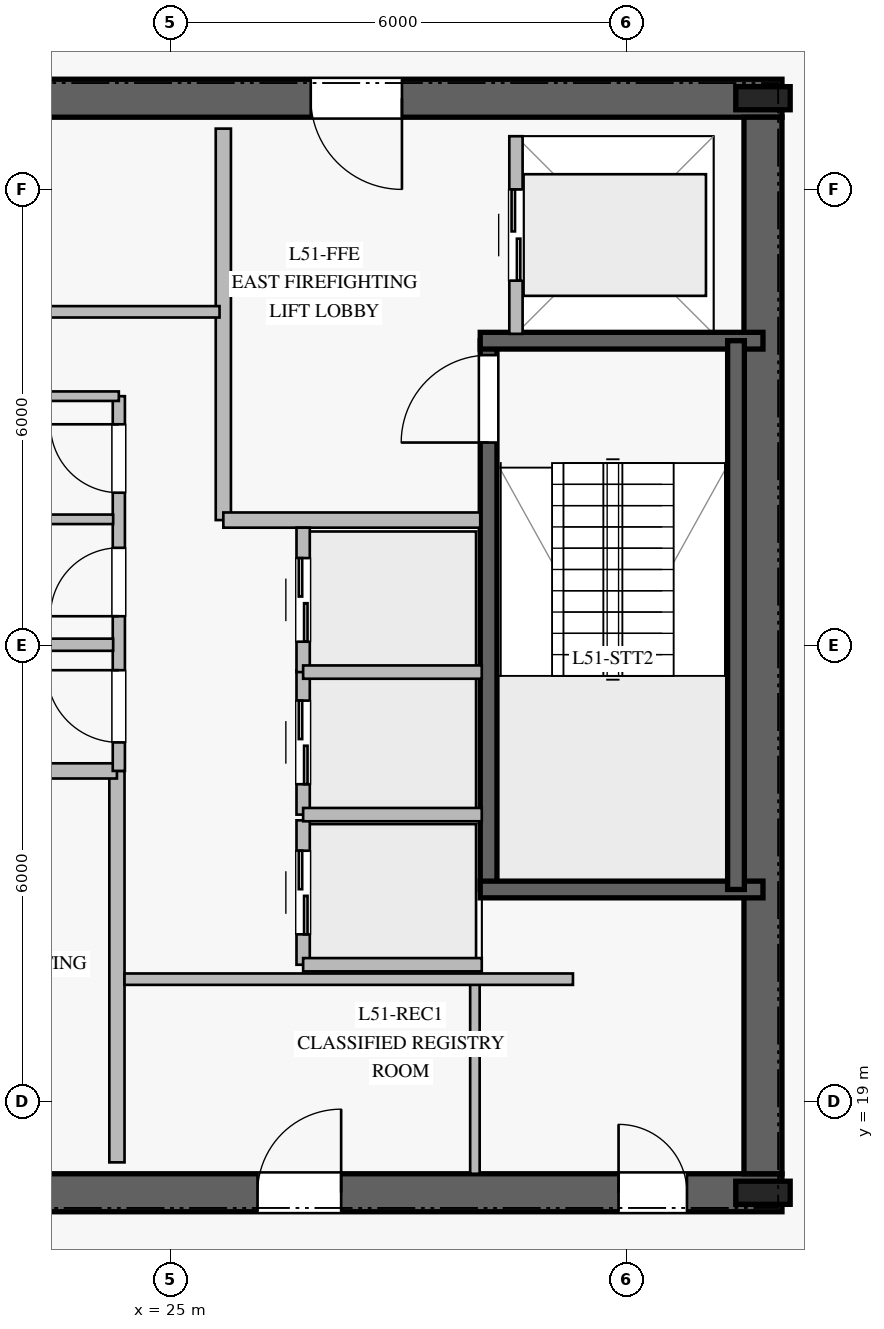
"""IFC4 building model, lengths in metres.
Left out: names, types, materials, properties, quantities, classifications, styles, units other than length and angle.
Written with IfcOpenShell. Run it as: python <this file> out.ifc"""

import sys

from ifc_helpers import new_model, si_unit, direction, frame, frame_2d, origin, origin_2d, place, context, subcontext, project, spatial, rectangle, i_section, extrude, element, fill, save


model = new_model("IFC4")
c1 = context("Model", 3, precision=1e-05, world=origin(), true_north=direction((0.0, 1.0)))
c2 = subcontext(c1, "Body", "Model", "MODEL_VIEW")
j1 = project(units=[si_unit("LENGTHUNIT", "METRE"), si_unit("PLANEANGLEUNIT", "RADIAN")], contexts=[c1])
p1 = place(None, origin())
s1 = spatial("IfcSite", under=j1, at=p1, CompositionType="ELEMENT")
p2 = place(p1, origin())
s2 = spatial("IfcBuilding", under=s1, at=p2, CompositionType="ELEMENT")
p3 = place(p2, frame((0.0, 0.0, 212.8)))
s3 = spatial("IfcBuildingStorey", under=s2, at=p3, CompositionType="ELEMENT", Elevation=212.8)
p4 = place(p3, frame((16.95, 17.8, 0.0), z_axis=(0.0, 0.0, 1.0), x_axis=(1.0, 0.0, 0.0)))
e1 = element("IfcWall", 1, at=p4, inside=s3, PredefinedType="SHEAR", context=c2, shape_type="SweptSolid", body=[
    extrude(rectangle(XDim=16.1, YDim=0.5, at=frame_2d((8.05, 0.0))), origin(), (0.0, 0.0, 1.0), 3.78),
])
p5 = place(p4, frame((5.0, 0.0, 0.0)))
e2 = element("IfcOpeningElement", 2, at=p5, cuts=e1, PredefinedType="OPENING", context=c2, shape_type="SweptSolid", body=[
    extrude(rectangle(XDim=1.2, YDim=2.25, at=frame_2d((0.6, 1.125))), frame((0.0, 0.26, 0.0), z_axis=(0.0, -1.0, 0.0), x_axis=(1.0, 0.0, 0.0)), (0.0, 0.0, 1.0), 0.52),
])
p6 = place(p4, frame((13.95, 0.0, 0.0)))
e3 = element("IfcOpeningElement", 3, at=p6, cuts=e1, PredefinedType="OPENING", context=c2, shape_type="SweptSolid", body=[
    extrude(rectangle(XDim=0.9, YDim=2.1, at=frame_2d((0.45, 1.05))), frame((0.0, 0.26, 0.0), z_axis=(0.0, -1.0, 0.0), x_axis=(1.0, 0.0, 0.0)), (0.0, 0.0, 1.0), 0.52),
])
p7 = place(p4, frame((9.2, 0.0, 0.0)))
e4 = element("IfcOpeningElement", 4, at=p7, cuts=e1, PredefinedType="OPENING", context=c2, shape_type="SweptSolid", body=[
    extrude(rectangle(XDim=1.1, YDim=2.2, at=frame_2d((0.55, 1.1))), frame((0.0, 0.26, 0.0), z_axis=(0.0, -1.0, 0.0), x_axis=(1.0, 0.0, 0.0)), (0.0, 0.0, 1.0), 0.52),
])
p8 = place(p3, frame((33.05, 32.2, 0.0), z_axis=(0.0, 0.0, 1.0), x_axis=(-1.0, 0.0, 0.0)))
e5 = element("IfcWall", 5, at=p8, inside=s3, PredefinedType="SHEAR", context=c2, shape_type="SweptSolid", body=[
    extrude(rectangle(XDim=16.1, YDim=0.5, at=frame_2d((8.05, 0.0))), origin(), (0.0, 0.0, 1.0), 3.78),
])
p9 = place(p8, frame((5.0, 0.0, 0.0)))
e6 = element("IfcOpeningElement", 6, at=p9, cuts=e5, PredefinedType="OPENING", context=c2, shape_type="SweptSolid", body=[
    extrude(rectangle(XDim=1.2, YDim=2.25, at=frame_2d((0.6, 1.125))), frame((0.0, 0.26, 0.0), z_axis=(0.0, -1.0, 0.0), x_axis=(1.0, 0.0, 0.0)), (0.0, 0.0, 1.0), 0.52),
])
p10 = place(p8, frame((9.825, 0.0, 0.0)))
e7 = element("IfcOpeningElement", 7, at=p10, cuts=e5, PredefinedType="OPENING", context=c2, shape_type="SweptSolid", body=[
    extrude(rectangle(XDim=1.1, YDim=2.2, at=frame_2d((0.55, 1.1))), frame((0.0, 0.26, 0.0), z_axis=(0.0, -1.0, 0.0), x_axis=(1.0, 0.0, 0.0)), (0.0, 0.0, 1.0), 0.52),
])
p11 = place(p3, frame((32.8, 18.05, 0.0), z_axis=(0.0, 0.0, 1.0), x_axis=(0.0, 1.0, 0.0)))
e8 = element("IfcWall", 8, at=p11, inside=s3, PredefinedType="SHEAR", context=c2, shape_type="SweptSolid", body=[
    extrude(rectangle(XDim=13.9, YDim=0.5, at=frame_2d((6.95, 0.0))), origin(), (0.0, 0.0, 1.0), 3.78),
])
for number, where, z_axis, x_axis in (
    (9, (32.8, 17.8, 0.0), (0.0, 0.0, 1.0), (1.0, 0.0, 0.0)),
    (10, (32.8, 32.2, 0.0), (0.0, 0.0, 1.0), (1.0, 0.0, 0.0)),
):
    element("IfcColumn", number, at=place(p3, frame(where, z_axis=z_axis, x_axis=x_axis)), inside=s3, PredefinedType="COLUMN", context=c2, shape_type="SweptSolid", body=[
        extrude(i_section(OverallWidth=0.304, OverallDepth=0.716, WebThickness=0.021, FlangeThickness=0.04, at=origin_2d()), origin(), (0.0, 0.0, 1.0), 4.0),
    ])
p12 = place(p3, frame((29.19, 21.79, 0.0), z_axis=(0.0, 0.0, 1.0), x_axis=(0.0, 1.0, 0.0)))
e11 = element("IfcWall", 11, at=p12, inside=s3, PredefinedType="SOLIDWALL", context=c2, shape_type="SweptSolid", body=[
    extrude(rectangle(XDim=7.22, YDim=0.22, at=frame_2d((3.61, 0.0))), origin(), (0.0, 0.0, 1.0), 3.78),
])
p13 = place(p12, frame((5.88, 0.0, 0.0)))
e12 = element("IfcOpeningElement", 12, at=p13, cuts=e11, PredefinedType="OPENING", context=c2, shape_type="SweptSolid", body=[
    extrude(rectangle(XDim=1.15, YDim=2.2, at=frame_2d((0.575, 1.1))), frame((0.0, 0.12, 0.0), z_axis=(0.0, -1.0, 0.0), x_axis=(1.0, 0.0, 0.0)), (0.0, 0.0, 1.0), 0.24),
])
for number, where, z_axis, x_axis in (
    (13, (29.08, 21.79, 0.0), (0.0, 0.0, 1.0), (1.0, 0.0, 0.0)),
    (14, (29.08, 29.01, 0.0), (0.0, 0.0, 1.0), (1.0, 0.0, 0.0)),
):
    element("IfcWall", number, at=place(p3, frame(where, z_axis=z_axis, x_axis=x_axis)), inside=s3, PredefinedType="SOLIDWALL", context=c2, shape_type="SweptSolid", body=[
        extrude(rectangle(XDim=3.72, YDim=0.22, at=frame_2d((1.86, 0.0))), origin(), (0.0, 0.0, 1.0), 3.78),
    ])
p14 = place(p3, frame((32.445, 29.01, 0.0), z_axis=(0.0, 0.0, 1.0), x_axis=(0.0, -1.0, 0.0)))
e15 = element("IfcWall", 15, at=p14, inside=s3, PredefinedType="SOLIDWALL", context=c2, shape_type="SweptSolid", body=[
    extrude(rectangle(XDim=7.22, YDim=0.22, at=frame_2d((3.61, 0.0))), origin(), (0.0, 0.0, 1.0), 3.78),
])
p15 = place(p3, frame((24.3, 18.2, 0.0), z_axis=(0.0, 0.0, 1.0), x_axis=(0.0, 1.0, 0.0)))
e16 = element("IfcWall", 16, at=p15, inside=s3, PredefinedType="PARTITIONING", context=c2, shape_type="SweptSolid", body=[
    extrude(rectangle(XDim=5.15, YDim=0.2, at=frame_2d((2.575, 0.0))), origin(), (0.0, 0.0, 1.0), 3.78),
])
p16 = place(p3, frame((20.92, 23.35, 0.0), z_axis=(0.0, 0.0, 1.0), x_axis=(1.0, 0.0, 0.0)))
e17 = element("IfcWall", 17, at=p16, inside=s3, PredefinedType="PARTITIONING", context=c2, shape_type="SweptSolid", body=[
    extrude(rectangle(XDim=3.38, YDim=0.2, at=frame_2d((1.69, 0.0))), origin(), (0.0, 0.0, 1.0), 3.78),
])
p17 = place(p3, frame((25.7, 26.65, 0.0), z_axis=(0.0, 0.0, 1.0), x_axis=(0.0, 1.0, 0.0)))
e18 = element("IfcWall", 18, at=p17, inside=s3, PredefinedType="PARTITIONING", context=c2, shape_type="SweptSolid", body=[
    extrude(rectangle(XDim=5.15, YDim=0.2, at=frame_2d((2.575, 0.0))), origin(), (0.0, 0.0, 1.0), 3.78),
])
p18 = place(p3, frame((25.7, 26.65, 0.0), z_axis=(0.0, 0.0, 1.0), x_axis=(1.0, 0.0, 0.0)))
e19 = element("IfcWall", 19, at=p18, inside=s3, PredefinedType="PARTITIONING", context=c2, shape_type="SweptSolid", body=[
    extrude(rectangle(XDim=3.38, YDim=0.2, at=frame_2d((1.69, 0.0))), origin(), (0.0, 0.0, 1.0), 3.78),
])
p19 = place(p3, frame((24.325, 23.35, 0.0), z_axis=(0.0, 0.0, 1.0), x_axis=(0.0, 1.0, 0.0)))
e20 = element("IfcWall", 20, at=p19, inside=s3, PredefinedType="PLUMBINGWALL", context=c2, shape_type="SweptSolid", body=[
    extrude(rectangle(XDim=4.93, YDim=0.16, at=frame_2d((2.465, 0.0))), origin(), (0.0, 0.0, 1.0), 3.78),
])
p20 = place(p19, frame((0.375, 0.0, 0.0)))
e21 = element("IfcOpeningElement", 21, at=p20, cuts=e20, PredefinedType="OPENING", context=c2, shape_type="SweptSolid", body=[
    extrude(rectangle(XDim=0.95, YDim=2.1, at=frame_2d((0.475, 1.05))), frame((0.0, 0.09, 0.0), z_axis=(0.0, -1.0, 0.0), x_axis=(1.0, 0.0, 0.0)), (0.0, 0.0, 1.0), 0.18),
])
p21 = place(p19, frame((2.035, 0.0, 0.0)))
e22 = element("IfcOpeningElement", 22, at=p21, cuts=e20, PredefinedType="OPENING", context=c2, shape_type="SweptSolid", body=[
    extrude(rectangle(XDim=0.9, YDim=2.1, at=frame_2d((0.45, 1.05))), frame((0.0, 0.09, 0.0), z_axis=(0.0, -1.0, 0.0), x_axis=(1.0, 0.0, 0.0)), (0.0, 0.0, 1.0), 0.18),
])
p22 = place(p19, frame((3.66, 0.0, 0.0)))
e23 = element("IfcOpeningElement", 23, at=p22, cuts=e20, PredefinedType="OPENING", context=c2, shape_type="SweptSolid", body=[
    extrude(rectangle(XDim=0.9, YDim=2.1, at=frame_2d((0.45, 1.05))), frame((0.0, 0.09, 0.0), z_axis=(0.0, -1.0, 0.0), x_axis=(1.0, 0.0, 0.0)), (0.0, 0.0, 1.0), 0.18),
])
p23 = place(p3, frame((20.92, 28.28, 0.0), z_axis=(0.0, 0.0, 1.0), x_axis=(1.0, 0.0, 0.0)))
e24 = element("IfcWall", 24, at=p23, inside=s3, PredefinedType="PARTITIONING", context=c2, shape_type="SweptSolid", body=[
    extrude(rectangle(XDim=3.405, YDim=0.125, at=frame_2d((1.703, 0.0))), origin(), (0.0, 0.0, 1.0), 3.78),
])
p24 = place(p3, frame((29.01, 18.05, 0.0), z_axis=(0.0, 0.0, 1.0), x_axis=(0.0, 1.0, 0.0)))
e25 = element("IfcWall", 25, at=p24, inside=s3, PredefinedType="PARTITIONING", context=c2, shape_type="SweptSolid", body=[
    extrude(rectangle(XDim=2.5, YDim=0.125, at=frame_2d((1.25, 0.0))), origin(), (0.0, 0.0, 1.0), 3.78),
])
p25 = place(p3, frame((20.95, 25.01, 0.0), z_axis=(0.0, 0.0, 1.0), x_axis=(1.0, 0.0, 0.0)))
e26 = element("IfcWall", 26, at=p25, inside=s3, PredefinedType="PLUMBINGWALL", context=c2, shape_type="SweptSolid", body=[
    extrude(rectangle(XDim=3.3, YDim=0.16, at=frame_2d((1.65, 0.0))), origin(), (0.0, 0.0, 1.0), 3.78),
])
p26 = place(p3, frame((20.95, 26.66, 0.0), z_axis=(0.0, 0.0, 1.0), x_axis=(1.0, 0.0, 0.0)))
e27 = element("IfcWall", 27, at=p26, inside=s3, PredefinedType="PARTITIONING", context=c2, shape_type="SweptSolid", body=[
    extrude(rectangle(XDim=3.3, YDim=0.125, at=frame_2d((1.65, 0.0))), origin(), (0.0, 0.0, 1.0), 3.78),
])
p27 = place(p3, frame((24.4, 20.61, 0.0), z_axis=(0.0, 0.0, 1.0), x_axis=(1.0, 0.0, 0.0)))
e28 = element("IfcWall", 28, at=p27, inside=s3, PredefinedType="PARTITIONING", context=c2, shape_type="SweptSolid", body=[
    extrude(rectangle(XDim=5.9, YDim=0.15, at=frame_2d((2.95, 0.0))), origin(), (0.0, 0.0, 1.0), 3.78),
])
p28 = place(p3, frame((19.75, 29.39, 0.0), z_axis=(0.0, 0.0, 1.0), x_axis=(1.0, 0.0, 0.0)))
e29 = element("IfcWall", 29, at=p28, inside=s3, PredefinedType="PARTITIONING", context=c2, shape_type="SweptSolid", body=[
    extrude(rectangle(XDim=5.9, YDim=0.15, at=frame_2d((2.95, 0.0))), origin(), (0.0, 0.0, 1.0), 3.78),
])
p29 = place(p3, frame((26.75, 20.8, 0.0), z_axis=(0.0, 0.0, 1.0), x_axis=(0.0, 1.0, 0.0)))
e30 = element("IfcWall", 30, at=p29, inside=s3, PredefinedType="PARTITIONING", context=c2, shape_type="SweptSolid", body=[
    extrude(rectangle(XDim=1.9, YDim=0.175, at=frame_2d((0.95, 0.0))), origin(), (0.0, 0.0, 1.0), 3.78),
])
p30 = place(p29, frame((0.4, 0.0, 0.0)))
e31 = element("IfcOpeningElement", 31, at=p30, cuts=e30, PredefinedType="OPENING", context=c2, shape_type="SweptSolid", body=[
    extrude(rectangle(XDim=1.1, YDim=2.2, at=frame_2d((0.55, 1.1))), frame((0.0, 0.098, 0.0), z_axis=(0.0, -1.0, 0.0), x_axis=(1.0, 0.0, 0.0)), (0.0, 0.0, 1.0), 0.195),
])
p31 = place(p3, frame((26.75, 20.8, 0.0), z_axis=(0.0, 0.0, 1.0), x_axis=(1.0, 0.0, 0.0)))
e32 = element("IfcWall", 32, at=p31, inside=s3, PredefinedType="PARTITIONING", context=c2, shape_type="SweptSolid", body=[
    extrude(rectangle(XDim=2.35, YDim=0.175, at=frame_2d((1.175, 0.0))), origin(), (0.0, 0.0, 1.0), 3.78),
])
p32 = place(p3, frame((26.75, 22.775, 0.0), z_axis=(0.0, 0.0, 1.0), x_axis=(0.0, 1.0, 0.0)))
e33 = element("IfcWall", 33, at=p32, inside=s3, PredefinedType="PARTITIONING", context=c2, shape_type="SweptSolid", body=[
    extrude(rectangle(XDim=1.9, YDim=0.175, at=frame_2d((0.95, 0.0))), origin(), (0.0, 0.0, 1.0), 3.78),
])
p33 = place(p32, frame((0.4, 0.0, 0.0)))
e34 = element("IfcOpeningElement", 34, at=p33, cuts=e33, PredefinedType="OPENING", context=c2, shape_type="SweptSolid", body=[
    extrude(rectangle(XDim=1.1, YDim=2.2, at=frame_2d((0.55, 1.1))), frame((0.0, 0.098, 0.0), z_axis=(0.0, -1.0, 0.0), x_axis=(1.0, 0.0, 0.0)), (0.0, 0.0, 1.0), 0.195),
])
p34 = place(p3, frame((26.75, 22.775, 0.0), z_axis=(0.0, 0.0, 1.0), x_axis=(1.0, 0.0, 0.0)))
e35 = element("IfcWall", 35, at=p34, inside=s3, PredefinedType="PARTITIONING", context=c2, shape_type="SweptSolid", body=[
    extrude(rectangle(XDim=2.35, YDim=0.175, at=frame_2d((1.175, 0.0))), origin(), (0.0, 0.0, 1.0), 3.78),
])
p35 = place(p3, frame((26.75, 24.65, 0.0), z_axis=(0.0, 0.0, 1.0), x_axis=(0.0, 1.0, 0.0)))
e36 = element("IfcWall", 36, at=p35, inside=s3, PredefinedType="PARTITIONING", context=c2, shape_type="SweptSolid", body=[
    extrude(rectangle(XDim=1.9, YDim=0.175, at=frame_2d((0.95, 0.0))), origin(), (0.0, 0.0, 1.0), 3.78),
])
p36 = place(p35, frame((0.4, 0.0, 0.0)))
e37 = element("IfcOpeningElement", 37, at=p36, cuts=e36, PredefinedType="OPENING", context=c2, shape_type="SweptSolid", body=[
    extrude(rectangle(XDim=1.1, YDim=2.2, at=frame_2d((0.55, 1.1))), frame((0.0, 0.098, 0.0), z_axis=(0.0, -1.0, 0.0), x_axis=(1.0, 0.0, 0.0)), (0.0, 0.0, 1.0), 0.195),
])
p37 = place(p3, frame((26.75, 24.65, 0.0), z_axis=(0.0, 0.0, 1.0), x_axis=(1.0, 0.0, 0.0)))
e38 = element("IfcWall", 38, at=p37, inside=s3, PredefinedType="PARTITIONING", context=c2, shape_type="SweptSolid", body=[
    extrude(rectangle(XDim=2.35, YDim=0.175, at=frame_2d((1.175, 0.0))), origin(), (0.0, 0.0, 1.0), 3.78),
])
p38 = place(p3, frame((29.55, 29.1, 0.0), z_axis=(0.0, 0.0, 1.0), x_axis=(0.0, 1.0, 0.0)))
e39 = element("IfcWall", 39, at=p38, inside=s3, PredefinedType="PARTITIONING", context=c2, shape_type="SweptSolid", body=[
    extrude(rectangle(XDim=2.6, YDim=0.175, at=frame_2d((1.3, 0.0))), origin(), (0.0, 0.0, 1.0), 3.78),
])
p39 = place(p38, frame((0.7, 0.0, 0.0)))
e40 = element("IfcOpeningElement", 40, at=p39, cuts=e39, PredefinedType="OPENING", context=c2, shape_type="SweptSolid", body=[
    extrude(rectangle(XDim=1.2, YDim=2.2, at=frame_2d((0.6, 1.1))), frame((0.0, 0.098, 0.0), z_axis=(0.0, -1.0, 0.0), x_axis=(1.0, 0.0, 0.0)), (0.0, 0.0, 1.0), 0.195),
])
p40 = place(p13, origin())
e41 = element("IfcDoor", 41, at=p40, inside=s3, OperationType="SINGLE_SWING_LEFT", PredefinedType="DOOR", context=c2, shape_type="SweptSolid", body=[
    extrude(rectangle(XDim=1.15, YDim=2.2, at=frame_2d((0.575, 1.1))), frame((0.0, 0.025, 0.0), z_axis=(0.0, -1.0, 0.0), x_axis=(1.0, 0.0, 0.0)), (0.0, 0.0, 1.0), 0.05),
])
fill(e12, e41)
p41 = place(p9, origin())
e42 = element("IfcDoor", 42, at=p41, inside=s3, OperationType="SINGLE_SWING_LEFT", PredefinedType="DOOR", context=c2, shape_type="SweptSolid", body=[
    extrude(rectangle(XDim=1.2, YDim=2.25, at=frame_2d((0.6, 1.125))), frame((0.0, 0.025, 0.0), z_axis=(0.0, -1.0, 0.0), x_axis=(1.0, 0.0, 0.0)), (0.0, 0.0, 1.0), 0.05),
])
fill(e6, e42)
p42 = place(p20, origin())
e43 = element("IfcDoor", 43, at=p42, inside=s3, OperationType="SINGLE_SWING_RIGHT", PredefinedType="DOOR", context=c2, shape_type="SweptSolid", body=[
    extrude(rectangle(XDim=0.95, YDim=2.1, at=frame_2d((0.475, 1.05))), frame((0.0, 0.025, 0.0), z_axis=(0.0, -1.0, 0.0), x_axis=(1.0, 0.0, 0.0)), (0.0, 0.0, 1.0), 0.05),
])
fill(e21, e43)
p43 = place(p21, origin())
e44 = element("IfcDoor", 44, at=p43, inside=s3, OperationType="SINGLE_SWING_LEFT", PredefinedType="DOOR", context=c2, shape_type="SweptSolid", body=[
    extrude(rectangle(XDim=0.9, YDim=2.1, at=frame_2d((0.45, 1.05))), frame((0.0, 0.025, 0.0), z_axis=(0.0, -1.0, 0.0), x_axis=(1.0, 0.0, 0.0)), (0.0, 0.0, 1.0), 0.05),
])
fill(e22, e44)
p44 = place(p22, origin())
e45 = element("IfcDoor", 45, at=p44, inside=s3, OperationType="SINGLE_SWING_RIGHT", PredefinedType="DOOR", context=c2, shape_type="SweptSolid", body=[
    extrude(rectangle(XDim=0.9, YDim=2.1, at=frame_2d((0.45, 1.05))), frame((0.0, 0.025, 0.0), z_axis=(0.0, -1.0, 0.0), x_axis=(1.0, 0.0, 0.0)), (0.0, 0.0, 1.0), 0.05),
])
fill(e23, e45)
p45 = place(p6, origin())
e46 = element("IfcDoor", 46, at=p45, inside=s3, OperationType="SINGLE_SWING_LEFT", PredefinedType="DOOR", context=c2, shape_type="SweptSolid", body=[
    extrude(rectangle(XDim=0.9, YDim=2.1, at=frame_2d((0.45, 1.05))), frame((0.0, 0.025, 0.0), z_axis=(0.0, -1.0, 0.0), x_axis=(1.0, 0.0, 0.0)), (0.0, 0.0, 1.0), 0.05),
])
fill(e3, e46)
p46 = place(p7, origin())
e47 = element("IfcDoor", 47, at=p46, inside=s3, OperationType="SINGLE_SWING_RIGHT", PredefinedType="DOOR", context=c2, shape_type="SweptSolid", body=[
    extrude(rectangle(XDim=1.1, YDim=2.2, at=frame_2d((0.55, 1.1))), frame((0.0, 0.025, 0.0), z_axis=(0.0, -1.0, 0.0), x_axis=(1.0, 0.0, 0.0)), (0.0, 0.0, 1.0), 0.05),
])
fill(e4, e47)
p47 = place(p30, origin())
e48 = element("IfcDoor", 48, at=p47, inside=s3, OperationType="DOUBLE_DOOR_SLIDING", PredefinedType="DOOR", context=c2, shape_type="SweptSolid", body=[
    extrude(rectangle(XDim=1.1, YDim=2.2, at=frame_2d((0.55, 1.1))), frame((0.0, 0.025, 0.0), z_axis=(0.0, -1.0, 0.0), x_axis=(1.0, 0.0, 0.0)), (0.0, 0.0, 1.0), 0.05),
])
fill(e31, e48)
p48 = place(p33, origin())
e49 = element("IfcDoor", 49, at=p48, inside=s3, OperationType="DOUBLE_DOOR_SLIDING", PredefinedType="DOOR", context=c2, shape_type="SweptSolid", body=[
    extrude(rectangle(XDim=1.1, YDim=2.2, at=frame_2d((0.55, 1.1))), frame((0.0, 0.025, 0.0), z_axis=(0.0, -1.0, 0.0), x_axis=(1.0, 0.0, 0.0)), (0.0, 0.0, 1.0), 0.05),
])
fill(e34, e49)
p49 = place(p36, origin())
e50 = element("IfcDoor", 50, at=p49, inside=s3, OperationType="DOUBLE_DOOR_SLIDING", PredefinedType="DOOR", context=c2, shape_type="SweptSolid", body=[
    extrude(rectangle(XDim=1.1, YDim=2.2, at=frame_2d((0.55, 1.1))), frame((0.0, 0.025, 0.0), z_axis=(0.0, -1.0, 0.0), x_axis=(1.0, 0.0, 0.0)), (0.0, 0.0, 1.0), 0.05),
])
fill(e37, e50)
p50 = place(p39, origin())
e51 = element("IfcDoor", 51, at=p50, inside=s3, OperationType="DOUBLE_DOOR_SLIDING", PredefinedType="DOOR", context=c2, shape_type="SweptSolid", body=[
    extrude(rectangle(XDim=1.2, YDim=2.2, at=frame_2d((0.6, 1.1))), frame((0.0, 0.025, 0.0), z_axis=(0.0, -1.0, 0.0), x_axis=(1.0, 0.0, 0.0)), (0.0, 0.0, 1.0), 0.05),
])
fill(e40, e51)
save(model, sys.argv[1])
